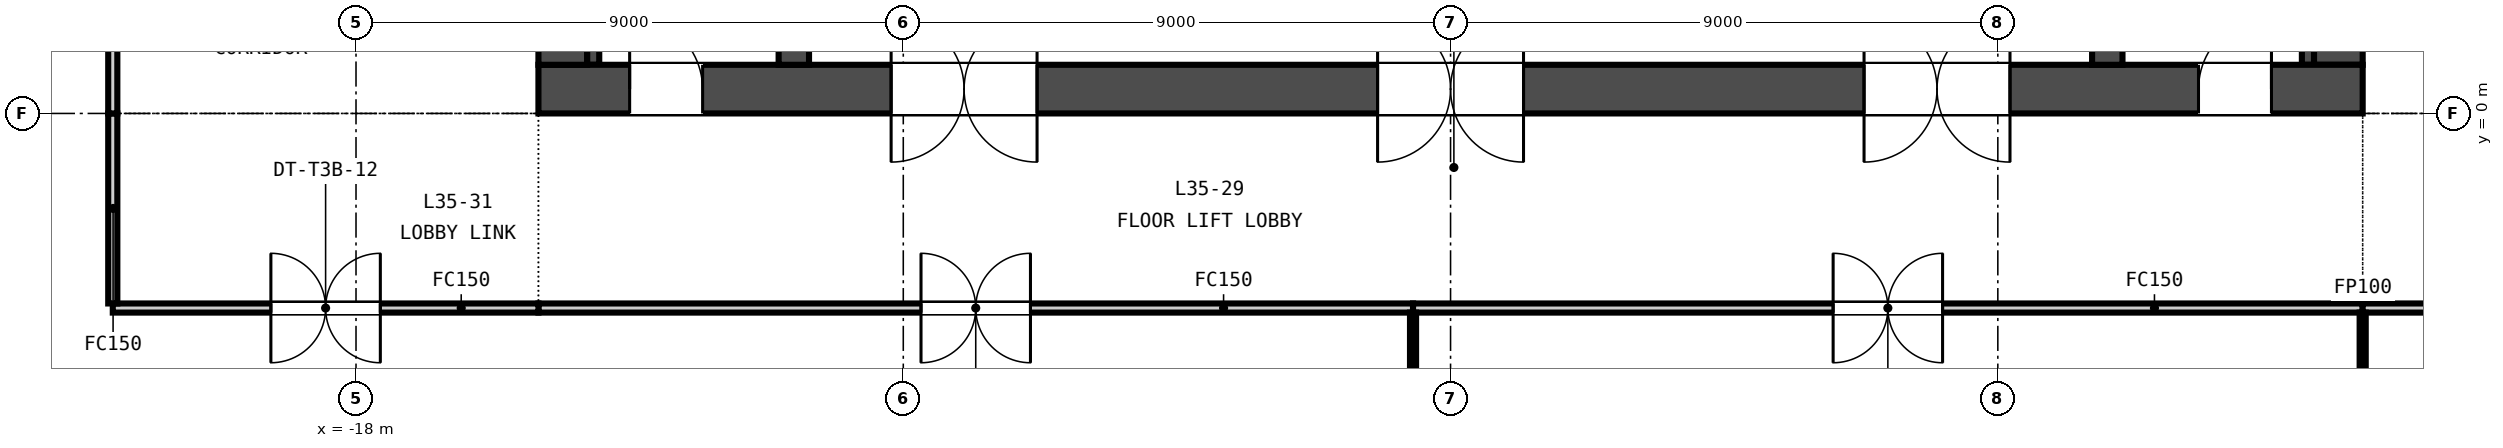
"""IFC4 building model, lengths in metres.
Left out: names, types, materials, properties, quantities, classifications, styles, units other than length and angle.
Written with IfcOpenShell. Run it as: python <this file> out.ifc"""

import sys

from ifc_helpers import new_model, si_unit, direction, frame, frame_2d, origin, place, context, subcontext, project, spatial, rectangle, extrude, element, fill, save


model = new_model("IFC4")
c1 = context("Model", 3, precision=1e-05, world=origin(), true_north=direction((0.0, 1.0)))
c2 = subcontext(c1, "Body", "Model", "MODEL_VIEW")
j1 = project(units=[si_unit("LENGTHUNIT", "METRE"), si_unit("PLANEANGLEUNIT", "RADIAN")], contexts=[c1])
p1 = place(None, origin())
s1 = spatial("IfcSite", under=j1, at=p1, CompositionType="ELEMENT")
p2 = place(p1, origin())
s2 = spatial("IfcBuilding", under=s1, at=p2, CompositionType="ELEMENT")
p3 = place(p2, frame((0.0, 0.0, 144.4)))
s3 = spatial("IfcBuildingStorey", under=s2, at=p3, CompositionType="ELEMENT", Elevation=144.4)
p4 = place(p3, frame((-15.0, 0.4, -0.15), z_axis=(0.0, 0.0, 1.0), x_axis=(1.0, 0.0, 0.0)))
e1 = element("IfcWall", 1, at=p4, inside=s3, PredefinedType="SOLIDWALL", context=c2, shape_type="SweptSolid", body=[
    extrude(rectangle(XDim=30.0, YDim=0.8, at=frame_2d((15.0, 0.0))), origin(), (0.0, 0.0, 1.0), 3.65),
])
p5 = place(p4, frame((5.8, 0.0, 0.15)))
e2 = element("IfcOpeningElement", 2, at=p5, cuts=e1, PredefinedType="OPENING", context=c2, shape_type="SweptSolid", body=[
    extrude(rectangle(XDim=2.4, YDim=2.4, at=frame_2d((1.2, 1.2))), frame((0.0, 0.41, 0.0), z_axis=(0.0, -1.0, 0.0), x_axis=(1.0, 0.0, 0.0)), (0.0, 0.0, 1.0), 0.82),
])
p6 = place(p4, frame((13.8, 0.0, 0.15)))
e3 = element("IfcOpeningElement", 3, at=p6, cuts=e1, PredefinedType="OPENING", context=c2, shape_type="SweptSolid", body=[
    extrude(rectangle(XDim=2.4, YDim=2.4, at=frame_2d((1.2, 1.2))), frame((0.0, 0.41, 0.0), z_axis=(0.0, -1.0, 0.0), x_axis=(1.0, 0.0, 0.0)), (0.0, 0.0, 1.0), 0.82),
])
p7 = place(p4, frame((21.8, 0.0, 0.15)))
e4 = element("IfcOpeningElement", 4, at=p7, cuts=e1, PredefinedType="OPENING", context=c2, shape_type="SweptSolid", body=[
    extrude(rectangle(XDim=2.4, YDim=2.4, at=frame_2d((1.2, 1.2))), frame((0.0, 0.41, 0.0), z_axis=(0.0, -1.0, 0.0), x_axis=(1.0, 0.0, 0.0)), (0.0, 0.0, 1.0), 0.82),
])
p8 = place(p4, frame((1.5, 0.0, 0.15)))
e5 = element("IfcOpeningElement", 5, at=p8, cuts=e1, PredefinedType="OPENING", context=c2, shape_type="SweptSolid", body=[
    extrude(rectangle(XDim=1.2, YDim=2.1, at=frame_2d((0.6, 1.05))), frame((0.0, 0.41, 0.0), z_axis=(0.0, -1.0, 0.0), x_axis=(1.0, 0.0, 0.0)), (0.0, 0.0, 1.0), 0.82),
])
p9 = place(p4, frame((27.3, 0.0, 0.15)))
e6 = element("IfcOpeningElement", 6, at=p9, cuts=e1, PredefinedType="OPENING", context=c2, shape_type="SweptSolid", body=[
    extrude(rectangle(XDim=1.2, YDim=2.1, at=frame_2d((0.6, 1.05))), frame((0.0, 0.41, 0.0), z_axis=(0.0, -1.0, 0.0), x_axis=(1.0, 0.0, 0.0)), (0.0, 0.0, 1.0), 0.82),
])
for number, where, z_axis, x_axis in (
    (7, (-14.6, 0.8, -0.15), (0.0, 0.0, 1.0), (0.0, 1.0, 0.0)),
    (8, (14.6, 0.8, -0.15), (0.0, 0.0, 1.0), (0.0, 1.0, 0.0)),
):
    element("IfcWall", number, at=place(p3, frame(where, z_axis=z_axis, x_axis=x_axis)), inside=s3, PredefinedType="SOLIDWALL", context=c2, shape_type="SweptSolid", body=[
        extrude(rectangle(XDim=13.4, YDim=0.8, at=frame_2d((6.7, 0.0))), origin(), (0.0, 0.0, 1.0), 3.65),
    ])
for number, where, z_axis, x_axis in (
    (9, (-10.8, 0.8, -0.15), (0.0, 0.0, 1.0), (0.0, 1.0, 0.0)),
    (10, (10.8, 0.8, -0.15), (0.0, 0.0, 1.0), (0.0, 1.0, 0.0)),
):
    element("IfcWall", number, at=place(p3, frame(where, z_axis=z_axis, x_axis=x_axis)), inside=s3, PredefinedType="SOLIDWALL", context=c2, shape_type="SweptSolid", body=[
        extrude(rectangle(XDim=13.4, YDim=0.5, at=frame_2d((6.7, 0.0))), origin(), (0.0, 0.0, 1.0), 3.65),
    ])
for number, where, z_axis, x_axis in (
    (11, (-14.1, 0.8, 0.0), (0.0, 0.0, 1.0), (0.0, 1.0, 0.0)),
    (12, (14.1, 0.8, 0.0), (0.0, 0.0, 1.0), (0.0, 1.0, 0.0)),
):
    element("IfcWall", number, at=place(p3, frame(where, z_axis=z_axis, x_axis=x_axis)), inside=s3, PredefinedType="SOLIDWALL", context=c2, shape_type="SweptSolid", body=[
        extrude(rectangle(XDim=13.4, YDim=0.2, at=frame_2d((6.7, 0.0))), origin(), (0.0, 0.0, 1.0), 3.5),
    ])
p10 = place(p3, frame((-0.617, -3.2, 0.0), z_axis=(0.0, 0.0, 1.0), x_axis=(-1.0, 0.0, 0.0)))
e13 = element("IfcWall", 13, at=p10, inside=s3, PredefinedType="PARTITIONING", context=c2, shape_type="SweptSolid", body=[
    extrude(rectangle(XDim=14.383, YDim=0.15, at=frame_2d((7.191, 0.0))), origin(), (0.0, 0.0, 1.0), 2.741),
])
p11 = place(p10, frame((6.292, 0.0, 0.0)))
e14 = element("IfcOpeningElement", 14, at=p11, cuts=e13, PredefinedType="OPENING", context=c2, shape_type="SweptSolid", body=[
    extrude(rectangle(XDim=1.8, YDim=2.1, at=frame_2d((0.9, 1.05))), frame((0.0, 0.085, 0.0), z_axis=(0.0, -1.0, 0.0), x_axis=(1.0, 0.0, 0.0)), (0.0, 0.0, 1.0), 0.17),
])
p12 = place(p3, frame((15.0, -3.2, 0.0), z_axis=(0.0, 0.0, 1.0), x_axis=(-1.0, 0.0, 0.0)))
e15 = element("IfcWall", 15, at=p12, inside=s3, PredefinedType="PARTITIONING", context=c2, shape_type="SweptSolid", body=[
    extrude(rectangle(XDim=15.617, YDim=0.15, at=frame_2d((7.809, 0.0))), origin(), (0.0, 0.0, 1.0), 2.741),
])
p13 = place(p12, frame((6.908, 0.0, 0.0)))
e16 = element("IfcOpeningElement", 16, at=p13, cuts=e15, PredefinedType="OPENING", context=c2, shape_type="SweptSolid", body=[
    extrude(rectangle(XDim=1.8, YDim=2.1, at=frame_2d((0.9, 1.05))), frame((0.0, 0.085, 0.0), z_axis=(0.0, -1.0, 0.0), x_axis=(1.0, 0.0, 0.0)), (0.0, 0.0, 1.0), 0.17),
])
p14 = place(p3, frame((22.0, -3.2, 0.0), z_axis=(0.0, 0.0, 1.0), x_axis=(-1.0, 0.0, 0.0)))
e17 = element("IfcWall", 17, at=p14, inside=s3, PredefinedType="PARTITIONING", context=c2, shape_type="SweptSolid", body=[
    extrude(rectangle(XDim=7.0, YDim=0.15, at=frame_2d((3.5, 0.0))), origin(), (0.0, 0.0, 1.0), 2.741),
])
p15 = place(p14, frame((3.0, 0.0, 0.0)))
e18 = element("IfcOpeningElement", 18, at=p15, cuts=e17, PredefinedType="OPENING", context=c2, shape_type="SweptSolid", body=[
    extrude(rectangle(XDim=1.0, YDim=2.1, at=frame_2d((0.5, 1.05))), frame((0.0, 0.085, 0.0), z_axis=(0.0, -1.0, 0.0), x_axis=(1.0, 0.0, 0.0)), (0.0, 0.0, 1.0), 0.17),
])
p16 = place(p3, frame((-15.0, -3.2, 0.0), z_axis=(0.0, 0.0, 1.0), x_axis=(-1.0, 0.0, 0.0)))
e19 = element("IfcWall", 19, at=p16, inside=s3, PredefinedType="PARTITIONING", context=c2, shape_type="SweptSolid", body=[
    extrude(rectangle(XDim=7.0, YDim=0.15, at=frame_2d((3.5, 0.0))), origin(), (0.0, 0.0, 1.0), 2.741),
])
p17 = place(p16, frame((2.6, 0.0, 0.0)))
e20 = element("IfcOpeningElement", 20, at=p17, cuts=e19, PredefinedType="OPENING", context=c2, shape_type="SweptSolid", body=[
    extrude(rectangle(XDim=1.8, YDim=2.1, at=frame_2d((0.9, 1.05))), frame((0.0, 0.085, 0.0), z_axis=(0.0, -1.0, 0.0), x_axis=(1.0, 0.0, 0.0)), (0.0, 0.0, 1.0), 0.17),
])
p18 = place(p3, frame((-22.0, -3.125, 0.0), z_axis=(0.0, 0.0, 1.0), x_axis=(0.0, 1.0, 0.0)))
e21 = element("IfcWall", 21, at=p18, inside=s3, PredefinedType="PARTITIONING", context=c2, shape_type="SweptSolid", body=[
    extrude(rectangle(XDim=3.125, YDim=0.15, at=frame_2d((1.562, 0.0))), origin(), (0.0, 0.0, 1.0), 2.741),
])
p19 = place(p3, frame((-22.0, 0.0, 0.0), z_axis=(0.0, 0.0, 1.0), x_axis=(0.0, 1.0, 0.0)))
e22 = element("IfcWall", 22, at=p19, inside=s3, PredefinedType="PARTITIONING", context=c2, shape_type="SweptSolid", body=[
    extrude(rectangle(XDim=3.165, YDim=0.15, at=frame_2d((1.583, 0.0))), origin(), (0.0, 0.0, 1.0), 2.741),
])
p20 = place(p3, frame((-0.617, -8.85, 0.0), z_axis=(0.0, 0.0, 1.0), x_axis=(0.0, 1.0, 0.0)))
e23 = element("IfcWall", 23, at=p20, inside=s3, PredefinedType="PARTITIONING", context=c2, shape_type="SweptSolid", body=[
    extrude(rectangle(XDim=5.575, YDim=0.1, at=frame_2d((2.788, 0.0))), origin(), (0.0, 0.0, 1.0), 2.741),
])
p21 = place(p3, frame((15.0, -4.7, 0.0), z_axis=(0.0, 0.0, 1.0), x_axis=(0.0, 1.0, 0.0)))
e24 = element("IfcWall", 24, at=p21, inside=s3, PredefinedType="PARTITIONING", context=c2, shape_type="SweptSolid", body=[
    extrude(rectangle(XDim=1.425, YDim=0.1, at=frame_2d((0.712, 0.0))), origin(), (0.0, 0.0, 1.0), 2.741),
])
p22 = place(p5, origin())
e25 = element("IfcDoor", 25, at=p22, inside=s3, OperationType="DOUBLE_DOOR_DOUBLE_SWING", PredefinedType="DOOR", context=c2, shape_type="SweptSolid", body=[
    extrude(rectangle(XDim=2.4, YDim=2.4, at=frame_2d((1.2, 1.2))), frame((0.0, 0.025, 0.0), z_axis=(0.0, -1.0, 0.0), x_axis=(1.0, 0.0, 0.0)), (0.0, 0.0, 1.0), 0.05),
])
fill(e2, e25)
p23 = place(p6, origin())
e26 = element("IfcDoor", 26, at=p23, inside=s3, OperationType="DOUBLE_DOOR_DOUBLE_SWING", PredefinedType="DOOR", context=c2, shape_type="SweptSolid", body=[
    extrude(rectangle(XDim=2.4, YDim=2.4, at=frame_2d((1.2, 1.2))), frame((0.0, 0.025, 0.0), z_axis=(0.0, -1.0, 0.0), x_axis=(1.0, 0.0, 0.0)), (0.0, 0.0, 1.0), 0.05),
])
fill(e3, e26)
p24 = place(p7, origin())
e27 = element("IfcDoor", 27, at=p24, inside=s3, OperationType="DOUBLE_DOOR_DOUBLE_SWING", PredefinedType="DOOR", context=c2, shape_type="SweptSolid", body=[
    extrude(rectangle(XDim=2.4, YDim=2.4, at=frame_2d((1.2, 1.2))), frame((0.0, 0.025, 0.0), z_axis=(0.0, -1.0, 0.0), x_axis=(1.0, 0.0, 0.0)), (0.0, 0.0, 1.0), 0.05),
])
fill(e4, e27)
p25 = place(p8, origin())
e28 = element("IfcDoor", 28, at=p25, inside=s3, OperationType="SINGLE_SWING_LEFT", PredefinedType="DOOR", context=c2, shape_type="SweptSolid", body=[
    extrude(rectangle(XDim=1.2, YDim=2.1, at=frame_2d((0.6, 1.05))), frame((0.0, 0.025, 0.0), z_axis=(0.0, -1.0, 0.0), x_axis=(1.0, 0.0, 0.0)), (0.0, 0.0, 1.0), 0.05),
])
fill(e5, e28)
p26 = place(p9, origin())
e29 = element("IfcDoor", 29, at=p26, inside=s3, OperationType="SINGLE_SWING_RIGHT", PredefinedType="DOOR", context=c2, shape_type="SweptSolid", body=[
    extrude(rectangle(XDim=1.2, YDim=2.1, at=frame_2d((0.6, 1.05))), frame((0.0, 0.025, 0.0), z_axis=(0.0, -1.0, 0.0), x_axis=(1.0, 0.0, 0.0)), (0.0, 0.0, 1.0), 0.05),
])
fill(e6, e29)
p27 = place(p11, origin())
e30 = element("IfcDoor", 30, at=p27, inside=s3, OperationType="DOUBLE_DOOR_DOUBLE_SWING", PredefinedType="DOOR", context=c2, shape_type="SweptSolid", body=[
    extrude(rectangle(XDim=1.8, YDim=2.1, at=frame_2d((0.9, 1.05))), frame((0.0, 0.025, 0.0), z_axis=(0.0, -1.0, 0.0), x_axis=(1.0, 0.0, 0.0)), (0.0, 0.0, 1.0), 0.05),
])
fill(e14, e30)
p28 = place(p17, origin())
e31 = element("IfcDoor", 31, at=p28, inside=s3, OperationType="DOUBLE_DOOR_DOUBLE_SWING", PredefinedType="DOOR", context=c2, shape_type="SweptSolid", body=[
    extrude(rectangle(XDim=1.8, YDim=2.1, at=frame_2d((0.9, 1.05))), frame((0.0, 0.025, 0.0), z_axis=(0.0, -1.0, 0.0), x_axis=(1.0, 0.0, 0.0)), (0.0, 0.0, 1.0), 0.05),
])
fill(e20, e31)
p29 = place(p13, origin())
e32 = element("IfcDoor", 32, at=p29, inside=s3, OperationType="DOUBLE_DOOR_DOUBLE_SWING", PredefinedType="DOOR", context=c2, shape_type="SweptSolid", body=[
    extrude(rectangle(XDim=1.8, YDim=2.1, at=frame_2d((0.9, 1.05))), frame((0.0, 0.025, 0.0), z_axis=(0.0, -1.0, 0.0), x_axis=(1.0, 0.0, 0.0)), (0.0, 0.0, 1.0), 0.05),
])
fill(e16, e32)
save(model, sys.argv[1])
